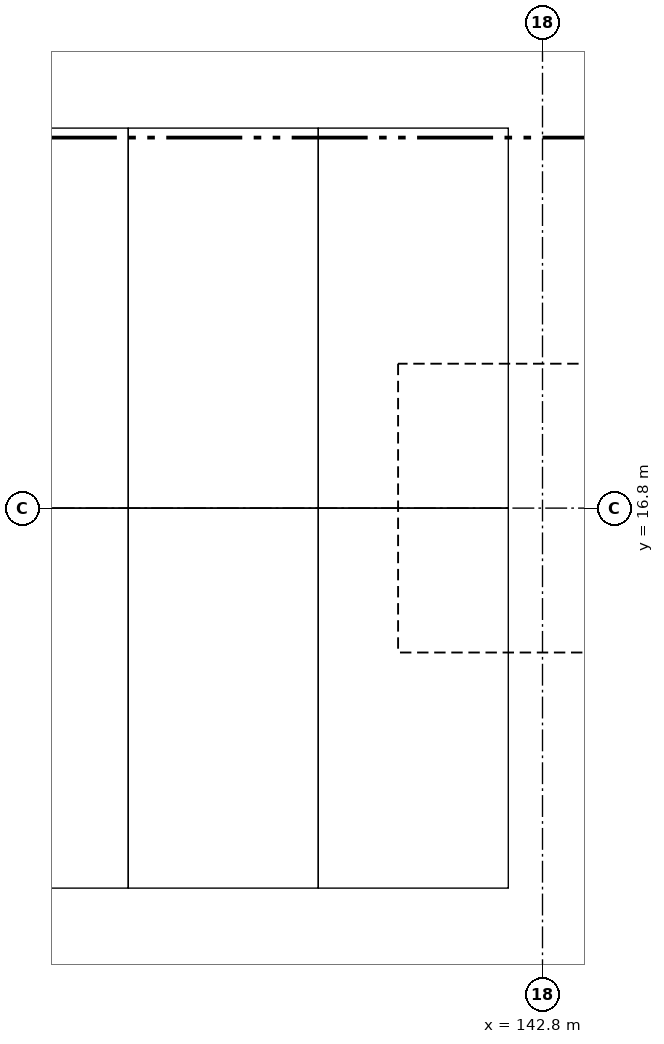
"""IFC4 building model, lengths in metres.
Left out: names, types, materials, properties, quantities, classifications, styles, units other than length and angle.
Written with IfcOpenShell. Run it as: python <this file> out.ifc"""

import sys

from ifc_helpers import new_model, si_unit, direction, frame, origin, origin_2d, place, context, subcontext, project, spatial, rectangle, extrude, element, save


model = new_model("IFC4")
c1 = context("Model", 3, precision=1e-05, world=origin(), true_north=direction((0.0, 1.0)))
c2 = subcontext(c1, "Body", "Model", "MODEL_VIEW")
j1 = project(units=[si_unit("LENGTHUNIT", "METRE"), si_unit("PLANEANGLEUNIT", "RADIAN")], contexts=[c1])
p1 = place(None, origin())
s1 = spatial("IfcSite", under=j1, at=p1, CompositionType="ELEMENT")
p2 = place(p1, origin())
s2 = spatial("IfcBuilding", under=s1, at=p2, CompositionType="ELEMENT")
p3 = place(p2, frame((0.0, 0.0, -3.0)))
s3 = spatial("IfcBuildingStorey", under=s2, at=p3, CompositionType="ELEMENT", Elevation=-3.0)
p4 = place(p3, frame((142.8, 16.8, 0.0), z_axis=(0.0, 0.0, 1.0), x_axis=(1.0, 0.0, 0.0)))
e1 = element("IfcColumn", 1, at=p4, inside=s3, PredefinedType="COLUMN", context=c2, shape_type="SweptSolid", body=[
    extrude(rectangle(XDim=0.8, YDim=0.8, at=origin_2d()), origin(), (0.0, 0.0, 1.0), 2.5),
])
save(model, sys.argv[1])
